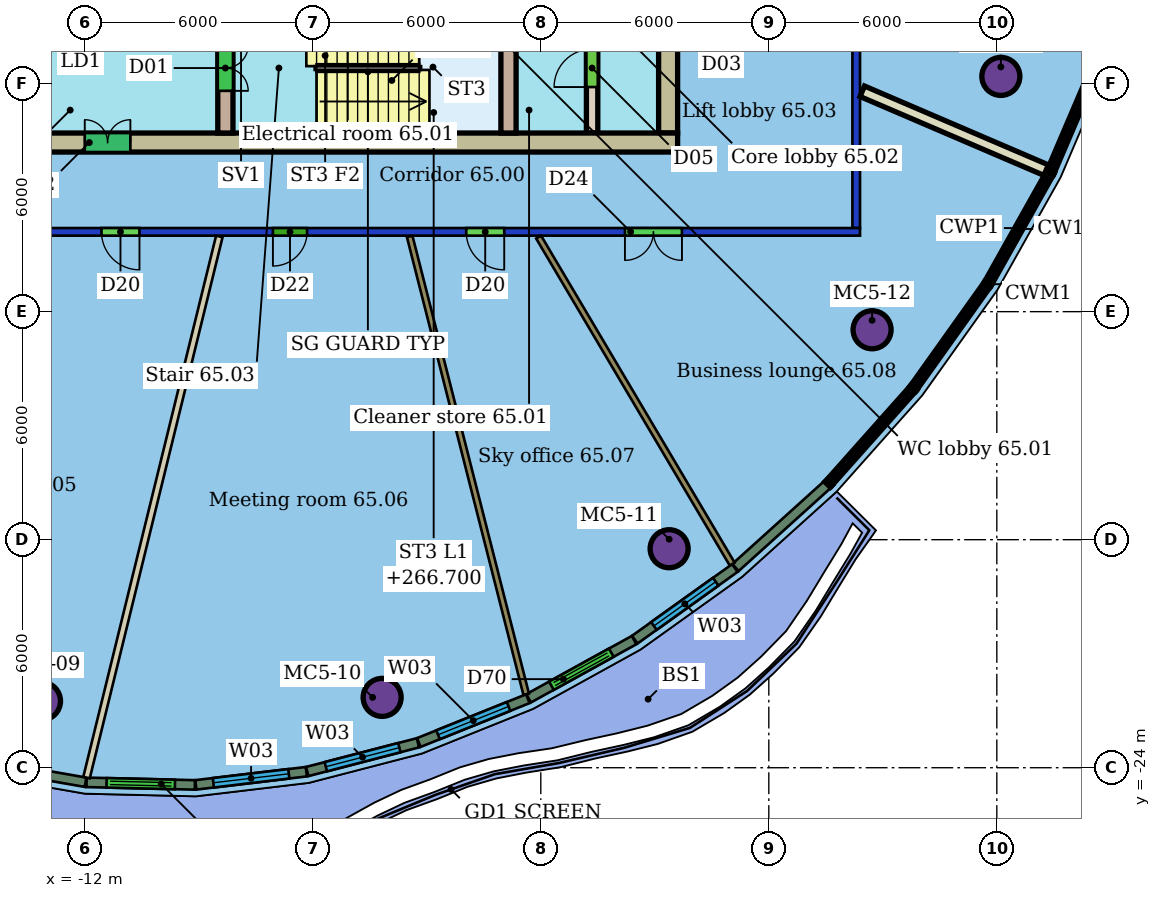
"""IFC4 building model, lengths in metres.
Left out: names, types, materials, properties, quantities, classifications, styles, units other than length and angle.
Written with IfcOpenShell. Run it as: python <this file> out.ifc"""

import sys

from ifc_helpers import new_model, si_unit, direction, frame, frame_2d, origin, origin_2d, place, context, subcontext, project, spatial, rectangle, hollow_circle, extrude, element, fill, save


model = new_model("IFC4")
c1 = context("Model", 3, precision=1e-05, world=origin(), true_north=direction((0.0, 1.0)))
c2 = subcontext(c1, "Body", "Model", "MODEL_VIEW")
j1 = project(units=[si_unit("LENGTHUNIT", "METRE"), si_unit("PLANEANGLEUNIT", "RADIAN")], contexts=[c1])
p1 = place(None, origin())
s1 = spatial("IfcSite", under=j1, at=p1, CompositionType="ELEMENT")
p2 = place(p1, origin())
s2 = spatial("IfcBuilding", under=s1, at=p2, CompositionType="ELEMENT")
p3 = place(p2, frame((0.0, 0.0, 264.9)))
s3 = spatial("IfcBuildingStorey", under=s2, at=p3, CompositionType="ELEMENT", Elevation=264.9)
for number, where, z_axis, x_axis in (
    (1, (-13.138, -22.247, 0.0), (0.0, 0.0, 1.0), (1.0, 0.0, 0.0)),
    (2, (-4.175, -22.149, 0.0), (0.0, 0.0, 1.0), (1.0, 0.0, 0.0)),
    (3, (3.377, -18.238, 0.0), (0.0, 0.0, 1.0), (1.0, 0.0, 0.0)),
    (4, (8.718, -12.477, 0.0), (0.0, 0.0, 1.0), (1.0, 0.0, 0.0)),
    (5, (12.106, -5.81, 0.0), (0.0, 0.0, 1.0), (1.0, 0.0, 0.0)),
):
    element("IfcColumn", number, at=place(p3, frame(where, z_axis=z_axis, x_axis=x_axis)), inside=s3, PredefinedType="COLUMN", context=c2, shape_type="SweptSolid", body=[
        extrude(hollow_circle(Radius=0.5, WallThickness=0.04, at=origin_2d()), origin(), (0.0, 0.0, 1.0), 3.45),
    ])
p4 = place(p3, frame((8.4, -9.9, 0.0), z_axis=(0.0, 0.0, 1.0), x_axis=(-1.0, 0.0, 0.0)))
e6 = element("IfcWall", 6, at=p4, inside=s3, PredefinedType="PARTITIONING", context=c2, shape_type="SweptSolid", body=[
    extrude(rectangle(XDim=28.8, YDim=0.2, at=frame_2d((14.4, 0.0))), origin(), (0.0, 0.0, 1.0), 3.1),
])
p5 = place(p4, frame((18.96, 0.0, 0.0)))
e7 = element("IfcOpeningElement", 7, at=p5, cuts=e6, PredefinedType="OPENING", context=c2, shape_type="SweptSolid", body=[
    extrude(rectangle(XDim=1.0, YDim=2.1, at=frame_2d((0.5, 1.05))), frame((0.0, 0.11, 0.0), z_axis=(0.0, -1.0, 0.0), x_axis=(1.0, 0.0, 0.0)), (0.0, 0.0, 1.0), 0.22),
])
p6 = place(p4, frame((14.549, 0.0, 0.0)))
e8 = element("IfcOpeningElement", 8, at=p6, cuts=e6, PredefinedType="OPENING", context=c2, shape_type="SweptSolid", body=[
    extrude(rectangle(XDim=0.9, YDim=2.1, at=frame_2d((0.45, 1.05))), frame((0.0, 0.11, 0.0), z_axis=(0.0, -1.0, 0.0), x_axis=(1.0, 0.0, 0.0)), (0.0, 0.0, 1.0), 0.22),
])
p7 = place(p4, frame((9.362, 0.0, 0.0)))
e9 = element("IfcOpeningElement", 9, at=p7, cuts=e6, PredefinedType="OPENING", context=c2, shape_type="SweptSolid", body=[
    extrude(rectangle(XDim=1.0, YDim=2.1, at=frame_2d((0.5, 1.05))), frame((0.0, 0.11, 0.0), z_axis=(0.0, -1.0, 0.0), x_axis=(1.0, 0.0, 0.0)), (0.0, 0.0, 1.0), 0.22),
])
p8 = place(p4, frame((4.686, 0.0, 0.0)))
e10 = element("IfcOpeningElement", 10, at=p8, cuts=e6, PredefinedType="OPENING", context=c2, shape_type="SweptSolid", body=[
    extrude(rectangle(XDim=1.5, YDim=2.1, at=frame_2d((0.75, 1.05))), frame((0.0, 0.11, 0.0), z_axis=(0.0, -1.0, 0.0), x_axis=(1.0, 0.0, 0.0)), (0.0, 0.0, 1.0), 0.22),
])
p9 = place(p3, frame((8.3, 9.8, 0.0), z_axis=(0.0, 0.0, 1.0), x_axis=(0.0, -1.0, 0.0)))
e11 = element("IfcWall", 11, at=p9, inside=s3, PredefinedType="PARTITIONING", context=c2, shape_type="SweptSolid", body=[
    extrude(rectangle(XDim=19.6, YDim=0.2, at=frame_2d((9.8, 0.0))), origin(), (0.0, 0.0, 1.0), 3.1),
])
p10 = place(p9, frame((7.946, 0.0, 0.0)))
e12 = element("IfcOpeningElement", 12, at=p10, cuts=e11, PredefinedType="OPENING", context=c2, shape_type="SweptSolid", body=[
    extrude(rectangle(XDim=1.8, YDim=2.4, at=frame_2d((0.9, 1.2))), frame((0.0, 0.11, 0.0), z_axis=(0.0, -1.0, 0.0), x_axis=(1.0, 0.0, 0.0)), (0.0, 0.0, 1.0), 0.22),
])
p11 = place(p9, frame((2.533, 0.0, 0.0)))
e13 = element("IfcOpeningElement", 13, at=p11, cuts=e11, PredefinedType="OPENING", context=c2, shape_type="SweptSolid", body=[
    extrude(rectangle(XDim=1.0, YDim=2.4, at=frame_2d((0.5, 1.2))), frame((0.0, 0.11, 0.0), z_axis=(0.0, -1.0, 0.0), x_axis=(1.0, 0.0, 0.0)), (0.0, 0.0, 1.0), 0.22),
])
p12 = place(p3, frame((-11.954, -24.26, 0.0), z_axis=(0.0, 0.0, 1.0), x_axis=(0.238333250225, 0.971183433671, 0.0)))
e14 = element("IfcWall", 14, at=p12, inside=s3, PredefinedType="PARTITIONING", context=c2, shape_type="SweptSolid", body=[
    extrude(rectangle(XDim=14.662, YDim=0.175, at=frame_2d((7.331, 0.0))), origin(), (0.0, 0.0, 1.0), 3.45),
])
p13 = place(p3, frame((-0.384, -22.067, 0.0), z_axis=(0.0, 0.0, 1.0), x_axis=(-0.246627305847, 0.969110402385, 0.0)))
e15 = element("IfcWall", 15, at=p13, inside=s3, PredefinedType="PARTITIONING", context=c2, shape_type="SweptSolid", body=[
    extrude(rectangle(XDim=12.432, YDim=0.15, at=frame_2d((6.216, 0.0))), origin(), (0.0, 0.0, 1.0), 3.45),
])
p14 = place(p3, frame((5.037, -18.642, 0.0), z_axis=(0.0, 0.0, 1.0), x_axis=(-0.509438244873, 0.860507219412, 0.0)))
e16 = element("IfcWall", 16, at=p14, inside=s3, PredefinedType="PARTITIONING", context=c2, shape_type="SweptSolid", body=[
    extrude(rectangle(XDim=9.999, YDim=0.15, at=frame_2d((5.0, 0.0))), origin(), (0.0, 0.0, 1.0), 3.45),
])
p15 = place(p3, frame((13.298, -8.276, 0.0), z_axis=(0.0, 0.0, 1.0), x_axis=(-0.919039472238, 0.39416550898, 0.0)))
e17 = element("IfcWall", 17, at=p15, inside=s3, PredefinedType="PARTITIONING", context=c2, shape_type="SweptSolid", body=[
    extrude(rectangle(XDim=5.265, YDim=0.3, at=frame_2d((2.633, 0.0))), origin(), (0.0, 0.0, 1.0), 3.45),
])
p16 = place(p3, frame((-14.684, -23.91, 0.0), z_axis=(0.0, 0.0, 1.0), x_axis=(0.985123538197, -0.171847649069, 0.0)))
e18 = element("IfcWall", 18, at=p16, inside=s3, PredefinedType="SOLIDWALL", context=c2, shape_type="SweptSolid", body=[
    extrude(rectangle(XDim=2.746, YDim=0.25, at=frame_2d((1.373, 0.0))), origin(), (0.0, 0.0, 1.0), 3.15),
])
p17 = place(p3, frame((-11.952, -24.385, 0.0), z_axis=(0.0, 0.0, 1.0), x_axis=(0.999718659369, -0.023719235002, 0.0)))
e19 = element("IfcWall", 19, at=p17, inside=s3, PredefinedType="SOLIDWALL", context=c2, shape_type="SweptSolid", body=[
    extrude(rectangle(XDim=2.851, YDim=0.25, at=frame_2d((1.426, 0.0))), origin(), (0.0, 0.0, 1.0), 3.15),
])
p18 = place(p17, frame((0.526, 0.0, 0.0)))
e20 = element("IfcOpeningElement", 20, at=p18, cuts=e19, PredefinedType="OPENING", context=c2, shape_type="SweptSolid", body=[
    extrude(rectangle(XDim=1.8, YDim=2.4, at=frame_2d((0.9, 1.2))), frame((0.0, 0.135, 0.0), z_axis=(0.0, -1.0, 0.0), x_axis=(1.0, 0.0, 0.0)), (0.0, 0.0, 1.0), 0.27),
])
p19 = place(p3, frame((-9.076, -24.451, 0.0), z_axis=(0.0, 0.0, 1.0), x_axis=(0.992981045758, 0.11827359285, 0.0)))
e21 = element("IfcWall", 21, at=p19, inside=s3, PredefinedType="SOLIDWALL", context=c2, shape_type="SweptSolid", body=[
    extrude(rectangle(XDim=2.927, YDim=0.25, at=frame_2d((1.463, 0.0))), origin(), (0.0, 0.0, 1.0), 3.15),
])
p20 = place(p19, frame((0.463, 0.0, 0.9)))
e22 = element("IfcOpeningElement", 22, at=p20, cuts=e21, PredefinedType="OPENING", context=c2, shape_type="SweptSolid", body=[
    extrude(rectangle(XDim=2.0, YDim=2.1, at=frame_2d((1.0, 1.05))), frame((0.0, 0.135, 0.0), z_axis=(0.0, -1.0, 0.0), x_axis=(1.0, 0.0, 0.0)), (0.0, 0.0, 1.0), 0.27),
])
p21 = place(p3, frame((-6.146, -24.1, 0.0), z_axis=(0.0, 0.0, 1.0), x_axis=(0.967956734752, 0.25111702381, 0.0)))
e23 = element("IfcWall", 23, at=p21, inside=s3, PredefinedType="SOLIDWALL", context=c2, shape_type="SweptSolid", body=[
    extrude(rectangle(XDim=3.009, YDim=0.25, at=frame_2d((1.504, 0.0))), origin(), (0.0, 0.0, 1.0), 3.15),
])
p22 = place(p21, frame((0.505, 0.0, 0.9)))
e24 = element("IfcOpeningElement", 24, at=p22, cuts=e23, PredefinedType="OPENING", context=c2, shape_type="SweptSolid", body=[
    extrude(rectangle(XDim=2.0, YDim=2.1, at=frame_2d((1.0, 1.05))), frame((0.0, 0.135, 0.0), z_axis=(0.0, -1.0, 0.0), x_axis=(1.0, 0.0, 0.0)), (0.0, 0.0, 1.0), 0.27),
])
p23 = place(p3, frame((-3.21, -23.337, 0.0), z_axis=(0.0, 0.0, 1.0), x_axis=(0.927849089634, 0.372955851093, 0.0)))
e25 = element("IfcWall", 25, at=p23, inside=s3, PredefinedType="SOLIDWALL", context=c2, shape_type="SweptSolid", body=[
    extrude(rectangle(XDim=3.092, YDim=0.25, at=frame_2d((1.546, 0.0))), origin(), (0.0, 0.0, 1.0), 3.15),
])
p24 = place(p23, frame((0.546, 0.0, 0.9)))
e26 = element("IfcOpeningElement", 26, at=p24, cuts=e25, PredefinedType="OPENING", context=c2, shape_type="SweptSolid", body=[
    extrude(rectangle(XDim=2.0, YDim=2.1, at=frame_2d((1.0, 1.05))), frame((0.0, 0.135, 0.0), z_axis=(0.0, -1.0, 0.0), x_axis=(1.0, 0.0, 0.0)), (0.0, 0.0, 1.0), 0.27),
])
p25 = place(p3, frame((-0.32, -22.174, 0.0), z_axis=(0.0, 0.0, 1.0), x_axis=(0.875491155983, 0.483234141794, 0.0)))
e27 = element("IfcWall", 27, at=p25, inside=s3, PredefinedType="SOLIDWALL", context=c2, shape_type="SweptSolid", body=[
    extrude(rectangle(XDim=3.169, YDim=0.25, at=frame_2d((1.584, 0.0))), origin(), (0.0, 0.0, 1.0), 3.15),
])
p26 = place(p25, frame((0.685, 0.0, 0.0)))
e28 = element("IfcOpeningElement", 28, at=p26, cuts=e27, PredefinedType="OPENING", context=c2, shape_type="SweptSolid", body=[
    extrude(rectangle(XDim=1.8, YDim=2.4, at=frame_2d((0.9, 1.2))), frame((0.0, 0.135, 0.0), z_axis=(0.0, -1.0, 0.0), x_axis=(1.0, 0.0, 0.0)), (0.0, 0.0, 1.0), 0.27),
])
p27 = place(p3, frame((2.474, -20.63, 0.0), z_axis=(0.0, 0.0, 1.0), x_axis=(0.81314194721, 0.582065437634, 0.0)))
e29 = element("IfcWall", 29, at=p27, inside=s3, PredefinedType="SOLIDWALL", context=c2, shape_type="SweptSolid", body=[
    extrude(rectangle(XDim=3.237, YDim=0.25, at=frame_2d((1.619, 0.0))), origin(), (0.0, 0.0, 1.0), 3.15),
])
p28 = place(p27, frame((0.619, 0.0, 0.9)))
e30 = element("IfcOpeningElement", 30, at=p28, cuts=e29, PredefinedType="OPENING", context=c2, shape_type="SweptSolid", body=[
    extrude(rectangle(XDim=2.0, YDim=2.1, at=frame_2d((1.0, 1.05))), frame((0.0, 0.135, 0.0), z_axis=(0.0, -1.0, 0.0), x_axis=(1.0, 0.0, 0.0)), (0.0, 0.0, 1.0), 0.27),
])
p29 = place(p3, frame((5.123, -18.732, 0.0), z_axis=(0.0, 0.0, 1.0), x_axis=(0.7424824804, 0.669865483734, 0.0)))
e31 = element("IfcWall", 31, at=p29, inside=s3, PredefinedType="SOLIDWALL", context=c2, shape_type="SweptSolid", body=[
    extrude(rectangle(XDim=3.248, YDim=0.25, at=frame_2d((1.624, 0.0))), origin(), (0.0, 0.0, 1.0), 3.15),
])
p30 = place(p3, frame((-15.6, -7.55, 0.0), z_axis=(0.0, 0.0, 1.0), x_axis=(1.0, 0.0, 0.0)))
e32 = element("IfcWall", 32, at=p30, inside=s3, PredefinedType="SHEAR", context=c2, shape_type="SweptSolid", body=[
    extrude(rectangle(XDim=19.2, YDim=0.5, at=frame_2d((9.6, 0.0))), origin(), (0.0, 0.0, 1.0), 3.3),
])
p31 = place(p30, frame((3.6, 0.0, 0.0)))
e33 = element("IfcOpeningElement", 33, at=p31, cuts=e32, PredefinedType="OPENING", context=c2, shape_type="SweptSolid", body=[
    extrude(rectangle(XDim=1.2, YDim=2.1, at=frame_2d((0.6, 1.05))), frame((0.0, 0.26, 0.0), z_axis=(0.0, -1.0, 0.0), x_axis=(1.0, 0.0, 0.0)), (0.0, 0.0, 1.0), 0.52),
])
p32 = place(p3, frame((3.35, -7.3, 0.0), z_axis=(0.0, 0.0, 1.0), x_axis=(0.0, 1.0, 0.0)))
e34 = element("IfcWall", 34, at=p32, inside=s3, PredefinedType="SHEAR", context=c2, shape_type="SweptSolid", body=[
    extrude(rectangle(XDim=14.6, YDim=0.5, at=frame_2d((7.3, 0.0))), origin(), (0.0, 0.0, 1.0), 3.3),
])
p33 = place(p32, frame((2.8, 0.0, 0.0)))
e35 = element("IfcOpeningElement", 35, at=p33, cuts=e34, PredefinedType="OPENING", context=c2, shape_type="SweptSolid", body=[
    extrude(rectangle(XDim=1.2, YDim=2.1, at=frame_2d((0.6, 1.05))), frame((0.0, 0.26, 0.0), z_axis=(0.0, -1.0, 0.0), x_axis=(1.0, 0.0, 0.0)), (0.0, 0.0, 1.0), 0.52),
])
p34 = place(p32, frame((10.6, 0.0, 0.0)))
e36 = element("IfcOpeningElement", 36, at=p34, cuts=e34, PredefinedType="OPENING", context=c2, shape_type="SweptSolid", body=[
    extrude(rectangle(XDim=1.2, YDim=2.1, at=frame_2d((0.6, 1.05))), frame((0.0, 0.26, 0.0), z_axis=(0.0, -1.0, 0.0), x_axis=(1.0, 0.0, 0.0)), (0.0, 0.0, 1.0), 0.52),
])
p35 = place(p3, frame((1.35, -7.3, 0.0), z_axis=(0.0, 0.0, 1.0), x_axis=(0.0, 1.0, 0.0)))
e37 = element("IfcWall", 37, at=p35, inside=s3, PredefinedType="SHEAR", context=c2, shape_type="SweptSolid", body=[
    extrude(rectangle(XDim=14.6, YDim=0.3, at=frame_2d((7.3, 0.0))), origin(), (0.0, 0.0, 1.0), 3.3),
])
p36 = place(p35, frame((1.21, 0.0, 0.0)))
e38 = element("IfcOpeningElement", 38, at=p36, cuts=e37, PredefinedType="OPENING", context=c2, shape_type="SweptSolid", body=[
    extrude(rectangle(XDim=1.0, YDim=2.1, at=frame_2d((0.5, 1.05))), frame((0.0, 0.16, 0.0), z_axis=(0.0, -1.0, 0.0), x_axis=(1.0, 0.0, 0.0)), (0.0, 0.0, 1.0), 0.32),
])
p37 = place(p35, frame((6.55, 0.0, 0.0)))
e39 = element("IfcOpeningElement", 39, at=p37, cuts=e37, PredefinedType="OPENING", context=c2, shape_type="SweptSolid", body=[
    extrude(rectangle(XDim=1.5, YDim=2.1, at=frame_2d((0.75, 1.05))), frame((0.0, 0.16, 0.0), z_axis=(0.0, -1.0, 0.0), x_axis=(1.0, 0.0, 0.0)), (0.0, 0.0, 1.0), 0.32),
])
p38 = place(p3, frame((-8.3, -3.88, 0.0), z_axis=(0.0, 0.0, 1.0), x_axis=(0.0, -1.0, 0.0)))
e40 = element("IfcWall", 40, at=p38, inside=s3, PredefinedType="SHEAR", context=c2, shape_type="SweptSolid", body=[
    extrude(rectangle(XDim=3.42, YDim=0.4, at=frame_2d((1.71, 0.0))), origin(), (0.0, 0.0, 1.0), 3.3),
])
p39 = place(p38, frame((1.11, 0.0, 0.0)))
e41 = element("IfcOpeningElement", 41, at=p39, cuts=e40, PredefinedType="OPENING", context=c2, shape_type="SweptSolid", body=[
    extrude(rectangle(XDim=1.2, YDim=2.1, at=frame_2d((0.6, 1.05))), frame((0.0, 0.21, 0.0), z_axis=(0.0, -1.0, 0.0), x_axis=(1.0, 0.0, 0.0)), (0.0, 0.0, 1.0), 0.42),
])
p40 = place(p3, frame((-0.85, -3.88, 0.0), z_axis=(0.0, 0.0, 1.0), x_axis=(0.0, -1.0, 0.0)))
e42 = element("IfcWall", 42, at=p40, inside=s3, PredefinedType="SHEAR", context=c2, shape_type="SweptSolid", body=[
    extrude(rectangle(XDim=3.42, YDim=0.4, at=frame_2d((1.71, 0.0))), origin(), (0.0, 0.0, 1.0), 3.3),
])
p41 = place(p5, origin())
e43 = element("IfcDoor", 43, at=p41, inside=s3, OperationType="SINGLE_SWING_LEFT", PredefinedType="DOOR", context=c2, shape_type="SweptSolid", body=[
    extrude(rectangle(XDim=1.0, YDim=2.1, at=frame_2d((0.5, 1.05))), frame((0.0, 0.025, 0.0), z_axis=(0.0, -1.0, 0.0), x_axis=(1.0, 0.0, 0.0)), (0.0, 0.0, 1.0), 0.05),
])
fill(e7, e43)
p42 = place(p6, origin())
e44 = element("IfcDoor", 44, at=p42, inside=s3, OperationType="SINGLE_SWING_RIGHT", PredefinedType="DOOR", context=c2, shape_type="SweptSolid", body=[
    extrude(rectangle(XDim=0.9, YDim=2.1, at=frame_2d((0.45, 1.05))), frame((0.0, 0.025, 0.0), z_axis=(0.0, -1.0, 0.0), x_axis=(1.0, 0.0, 0.0)), (0.0, 0.0, 1.0), 0.05),
])
fill(e8, e44)
p43 = place(p7, origin())
e45 = element("IfcDoor", 45, at=p43, inside=s3, OperationType="SINGLE_SWING_LEFT", PredefinedType="DOOR", context=c2, shape_type="SweptSolid", body=[
    extrude(rectangle(XDim=1.0, YDim=2.1, at=frame_2d((0.5, 1.05))), frame((0.0, 0.025, 0.0), z_axis=(0.0, -1.0, 0.0), x_axis=(1.0, 0.0, 0.0)), (0.0, 0.0, 1.0), 0.05),
])
fill(e9, e45)
p44 = place(p8, origin())
e46 = element("IfcDoor", 46, at=p44, inside=s3, OperationType="DOUBLE_DOOR_SINGLE_SWING", PredefinedType="DOOR", context=c2, shape_type="SweptSolid", body=[
    extrude(rectangle(XDim=1.5, YDim=2.1, at=frame_2d((0.75, 1.05))), frame((0.0, 0.025, 0.0), z_axis=(0.0, -1.0, 0.0), x_axis=(1.0, 0.0, 0.0)), (0.0, 0.0, 1.0), 0.05),
])
fill(e10, e46)
p45 = place(p18, origin())
e47 = element("IfcDoor", 47, at=p45, inside=s3, OperationType="DOUBLE_DOOR_SLIDING", PredefinedType="DOOR", context=c2, shape_type="SweptSolid", body=[
    extrude(rectangle(XDim=1.8, YDim=2.4, at=frame_2d((0.9, 1.2))), frame((0.0, 0.025, 0.0), z_axis=(0.0, -1.0, 0.0), x_axis=(1.0, 0.0, 0.0)), (0.0, 0.0, 1.0), 0.05),
])
fill(e20, e47)
p46 = place(p20, origin())
e48 = element("IfcWindow", 48, at=p46, inside=s3, PartitioningType="SINGLE_PANEL", PredefinedType="WINDOW", context=c2, shape_type="SweptSolid", body=[
    extrude(rectangle(XDim=2.0, YDim=2.1, at=frame_2d((1.0, 1.05))), frame((0.0, 0.03, 0.0), z_axis=(0.0, -1.0, 0.0), x_axis=(1.0, 0.0, 0.0)), (0.0, 0.0, 1.0), 0.06),
])
fill(e22, e48)
p47 = place(p22, origin())
e49 = element("IfcWindow", 49, at=p47, inside=s3, PartitioningType="SINGLE_PANEL", PredefinedType="WINDOW", context=c2, shape_type="SweptSolid", body=[
    extrude(rectangle(XDim=2.0, YDim=2.1, at=frame_2d((1.0, 1.05))), frame((0.0, 0.03, 0.0), z_axis=(0.0, -1.0, 0.0), x_axis=(1.0, 0.0, 0.0)), (0.0, 0.0, 1.0), 0.06),
])
fill(e24, e49)
p48 = place(p24, origin())
e50 = element("IfcWindow", 50, at=p48, inside=s3, PartitioningType="SINGLE_PANEL", PredefinedType="WINDOW", context=c2, shape_type="SweptSolid", body=[
    extrude(rectangle(XDim=2.0, YDim=2.1, at=frame_2d((1.0, 1.05))), frame((0.0, 0.03, 0.0), z_axis=(0.0, -1.0, 0.0), x_axis=(1.0, 0.0, 0.0)), (0.0, 0.0, 1.0), 0.06),
])
fill(e26, e50)
p49 = place(p26, origin())
e51 = element("IfcDoor", 51, at=p49, inside=s3, OperationType="DOUBLE_DOOR_SLIDING", PredefinedType="DOOR", context=c2, shape_type="SweptSolid", body=[
    extrude(rectangle(XDim=1.8, YDim=2.4, at=frame_2d((0.9, 1.2))), frame((0.0, 0.025, 0.0), z_axis=(0.0, -1.0, 0.0), x_axis=(1.0, 0.0, 0.0)), (0.0, 0.0, 1.0), 0.05),
])
fill(e28, e51)
p50 = place(p28, origin())
e52 = element("IfcWindow", 52, at=p50, inside=s3, PartitioningType="SINGLE_PANEL", PredefinedType="WINDOW", context=c2, shape_type="SweptSolid", body=[
    extrude(rectangle(XDim=2.0, YDim=2.1, at=frame_2d((1.0, 1.05))), frame((0.0, 0.03, 0.0), z_axis=(0.0, -1.0, 0.0), x_axis=(1.0, 0.0, 0.0)), (0.0, 0.0, 1.0), 0.06),
])
fill(e30, e52)
p51 = place(p31, origin())
e53 = element("IfcDoor", 53, at=p51, inside=s3, OperationType="DOUBLE_DOOR_SINGLE_SWING", PredefinedType="NOTDEFINED", context=c2, shape_type="SweptSolid", body=[
    extrude(rectangle(XDim=1.2, YDim=2.1, at=frame_2d((0.6, 1.05))), frame((0.0, 0.025, 0.0), z_axis=(0.0, -1.0, 0.0), x_axis=(1.0, 0.0, 0.0)), (0.0, 0.0, 1.0), 0.05),
])
fill(e33, e53)
p52 = place(p36, origin())
e54 = element("IfcDoor", 54, at=p52, inside=s3, OperationType="SINGLE_SWING_LEFT", PredefinedType="NOTDEFINED", context=c2, shape_type="SweptSolid", body=[
    extrude(rectangle(XDim=1.0, YDim=2.1, at=frame_2d((0.5, 1.05))), frame((0.0, 0.025, 0.0), z_axis=(0.0, -1.0, 0.0), x_axis=(1.0, 0.0, 0.0)), (0.0, 0.0, 1.0), 0.05),
])
fill(e38, e54)
p53 = place(p39, origin())
e55 = element("IfcDoor", 55, at=p53, inside=s3, OperationType="DOUBLE_DOOR_SINGLE_SWING", PredefinedType="NOTDEFINED", context=c2, shape_type="SweptSolid", body=[
    extrude(rectangle(XDim=1.2, YDim=2.1, at=frame_2d((0.6, 1.05))), frame((0.0, 0.025, 0.0), z_axis=(0.0, -1.0, 0.0), x_axis=(1.0, 0.0, 0.0)), (0.0, 0.0, 1.0), 0.05),
])
fill(e41, e55)
save(model, sys.argv[1])
